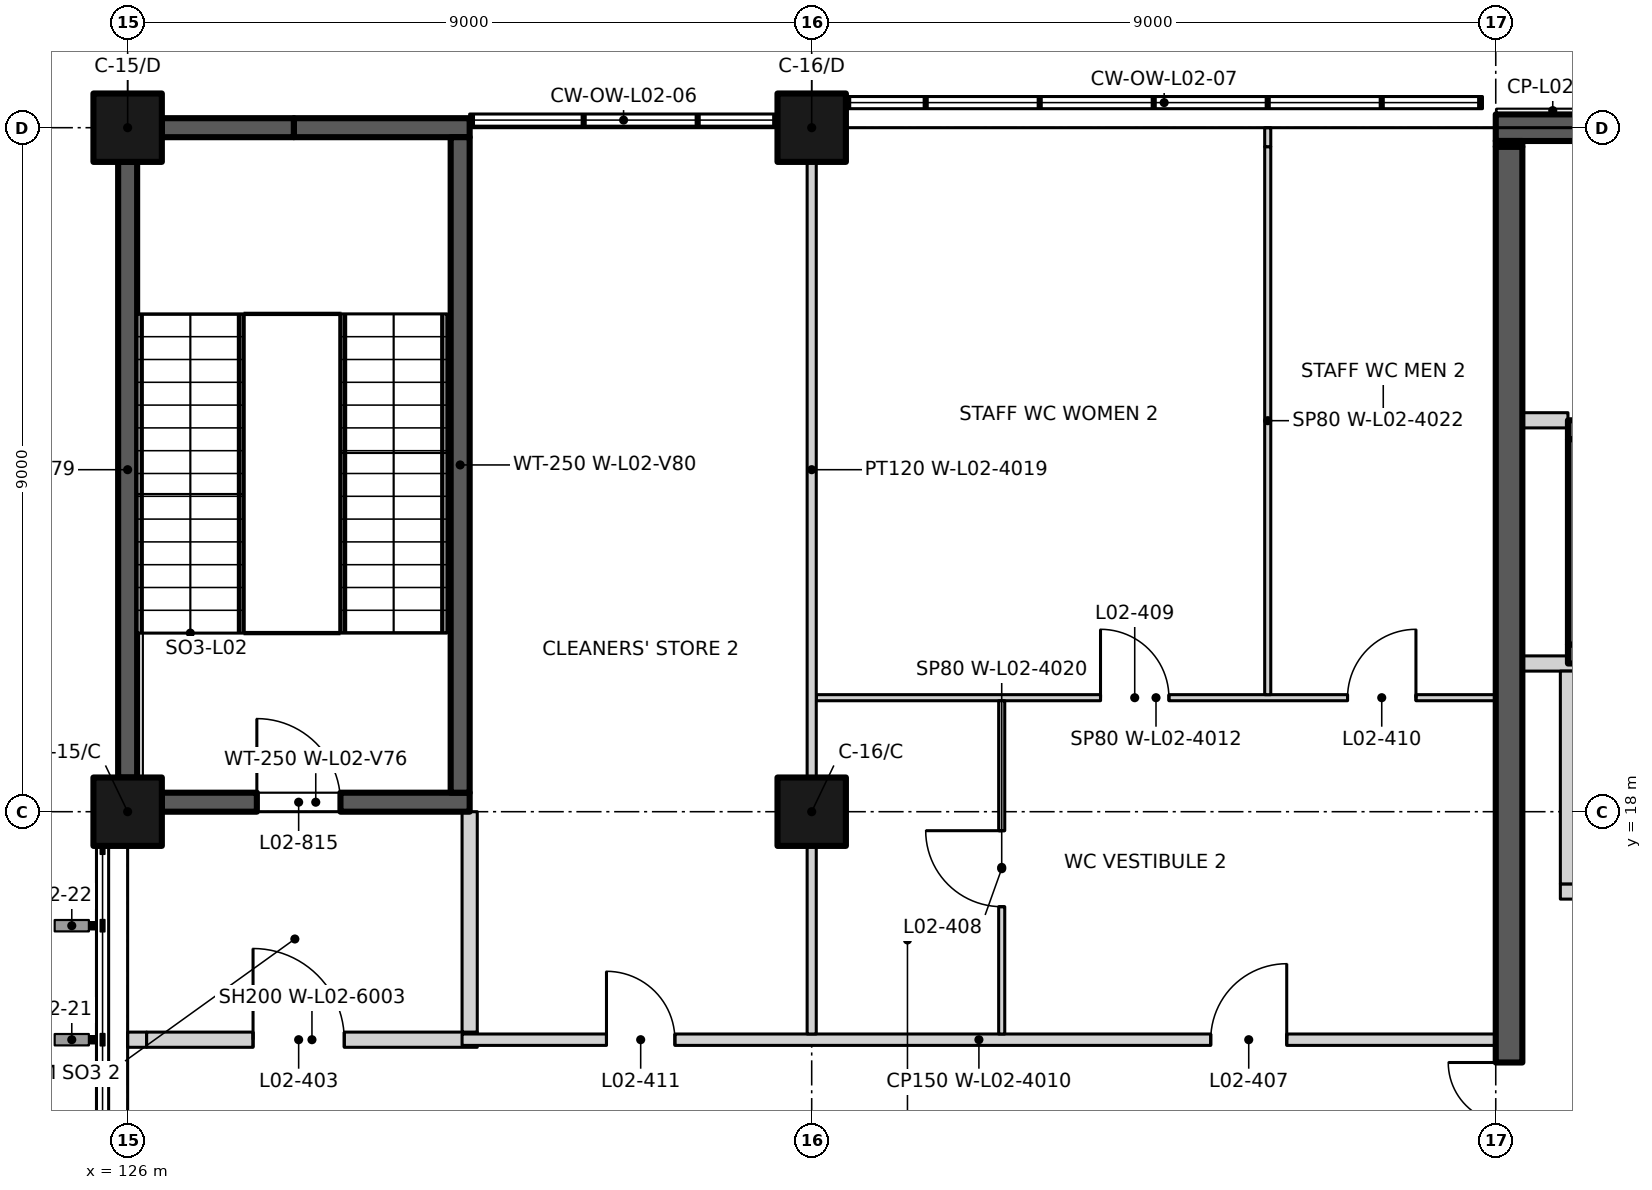
"""IFC4 building model, lengths in metres.
Left out: names, types, materials, properties, quantities, classifications, styles, units other than length and angle.
Written with IfcOpenShell. Run it as: python <this file> out.ifc"""

import sys

from ifc_helpers import new_model, si_unit, direction, frame, frame_2d, origin, origin_2d, place, context, subcontext, project, spatial, rectangle, extrude, element, fill, save


model = new_model("IFC4")
c1 = context("Model", 3, precision=1e-05, world=origin(), true_north=direction((0.0, 1.0)))
c2 = subcontext(c1, "Body", "Model", "MODEL_VIEW")
j1 = project(units=[si_unit("LENGTHUNIT", "METRE"), si_unit("PLANEANGLEUNIT", "RADIAN")], contexts=[c1])
p1 = place(None, origin())
s1 = spatial("IfcSite", under=j1, at=p1, CompositionType="ELEMENT")
p2 = place(p1, origin())
s2 = spatial("IfcBuilding", under=s1, at=p2, CompositionType="ELEMENT")
p3 = place(p2, frame((0.0, 0.0, 10.5)))
s3 = spatial("IfcBuildingStorey", under=s2, at=p3, CompositionType="ELEMENT", Elevation=10.5)
for number, where, z_axis, x_axis in (
    (1, (126.0, 18.0, 0.0), (0.0, 0.0, 1.0), (1.0, 0.0, 0.0)),
    (2, (135.0, 18.0, 0.0), (0.0, 0.0, 1.0), (1.0, 0.0, 0.0)),
    (3, (126.0, 27.0, 0.0), (0.0, 0.0, 1.0), (1.0, 0.0, 0.0)),
    (4, (135.0, 27.0, 0.0), (0.0, 0.0, 1.0), (1.0, 0.0, 0.0)),
):
    element("IfcColumn", number, at=place(p3, frame(where, z_axis=z_axis, x_axis=x_axis)), inside=s3, PredefinedType="COLUMN", context=c2, shape_type="SweptSolid", body=[
        extrude(rectangle(XDim=0.9, YDim=0.9, at=origin_2d()), origin(), (0.0, 0.0, 1.0), 4.5),
    ])
p4 = place(p3, frame((126.45, 18.125, 0.0), z_axis=(0.0, 0.0, 1.0), x_axis=(1.0, 0.0, 0.0)))
e5 = element("IfcWall", 5, at=p4, inside=s3, PredefinedType="SHEAR", context=c2, shape_type="SweptSolid", body=[
    extrude(rectangle(XDim=4.05, YDim=0.25, at=frame_2d((2.025, 0.0))), origin(), (0.0, 0.0, 1.0), 4.5),
])
p5 = place(p4, frame((1.25, 0.0, 0.0)))
e6 = element("IfcOpeningElement", 6, at=p5, cuts=e5, PredefinedType="OPENING", context=c2, shape_type="SweptSolid", body=[
    extrude(rectangle(XDim=1.1, YDim=2.1, at=frame_2d((0.55, 1.05))), frame((0.0, 0.135, 0.0), z_axis=(0.0, -1.0, 0.0), x_axis=(1.0, 0.0, 0.0)), (0.0, 0.0, 1.0), 0.27),
])
p6 = place(p3, frame((126.45, 27.0, 0.0), z_axis=(0.0, 0.0, 1.0), x_axis=(1.0, 0.0, 0.0)))
e7 = element("IfcWall", 7, at=p6, inside=s3, PredefinedType="SHEAR", context=c2, shape_type="SweptSolid", body=[
    extrude(rectangle(XDim=1.738, YDim=0.25, at=frame_2d((0.869, 0.0))), origin(), (0.0, 0.0, 1.0), 4.5),
])
p7 = place(p3, frame((128.188, 27.0, 0.0), z_axis=(0.0, 0.0, 1.0), x_axis=(1.0, 0.0, 0.0)))
e8 = element("IfcWall", 8, at=p7, inside=s3, PredefinedType="SHEAR", context=c2, shape_type="SweptSolid", body=[
    extrude(rectangle(XDim=2.312, YDim=0.25, at=frame_2d((1.156, 0.0))), origin(), (0.0, 0.0, 1.0), 4.5),
])
p8 = place(p3, frame((126.0, 18.45, 0.0), z_axis=(0.0, 0.0, 1.0), x_axis=(0.0, 1.0, 0.0)))
e9 = element("IfcWall", 9, at=p8, inside=s3, PredefinedType="SHEAR", context=c2, shape_type="SweptSolid", body=[
    extrude(rectangle(XDim=8.1, YDim=0.25, at=frame_2d((4.05, 0.0))), origin(), (0.0, 0.0, 1.0), 4.5),
])
p9 = place(p3, frame((130.375, 18.25, 0.0), z_axis=(0.0, 0.0, 1.0), x_axis=(0.0, 1.0, 0.0)))
e10 = element("IfcWall", 10, at=p9, inside=s3, PredefinedType="SHEAR", context=c2, shape_type="SweptSolid", body=[
    extrude(rectangle(XDim=8.625, YDim=0.25, at=frame_2d((4.312, 0.0))), origin(), (0.0, 0.0, 1.0), 4.5),
])
p10 = place(p3, frame((144.95, 20.075, 0.0), z_axis=(0.0, 0.0, 1.0), x_axis=(1.0, 0.0, 0.0)))
e11 = element("IfcWall", 11, at=p10, inside=s3, PredefinedType="SHEAR", context=c2, shape_type="SweptSolid", body=[
    extrude(rectangle(XDim=6.15, YDim=0.25, at=frame_2d((3.075, 0.0))), origin(), (0.0, 0.0, 1.0), 4.5),
])
p11 = place(p10, frame((1.05, 0.0, 0.0)))
e12 = element("IfcOpeningElement", 12, at=p11, cuts=e11, PredefinedType="OPENING", context=c2, shape_type="SweptSolid", body=[
    extrude(rectangle(XDim=1.1, YDim=2.1, at=frame_2d((0.55, 1.05))), frame((0.0, 0.135, 0.0), z_axis=(0.0, -1.0, 0.0), x_axis=(1.0, 0.0, 0.0)), (0.0, 0.0, 1.0), 0.27),
])
p12 = place(p10, frame((4.0, 0.0, 0.0)))
e13 = element("IfcOpeningElement", 13, at=p12, cuts=e11, PredefinedType="OPENING", context=c2, shape_type="SweptSolid", body=[
    extrude(rectangle(XDim=1.1, YDim=2.1, at=frame_2d((0.55, 1.05))), frame((0.0, 0.135, 0.0), z_axis=(0.0, -1.0, 0.0), x_axis=(1.0, 0.0, 0.0)), (0.0, 0.0, 1.0), 0.27),
])
p13 = place(p3, frame((144.95, 23.025, 0.0), z_axis=(0.0, 0.0, 1.0), x_axis=(1.0, 0.0, 0.0)))
e14 = element("IfcWall", 14, at=p13, inside=s3, PredefinedType="SHEAR", context=c2, shape_type="SweptSolid", body=[
    extrude(rectangle(XDim=6.15, YDim=0.25, at=frame_2d((3.075, 0.0))), origin(), (0.0, 0.0, 1.0), 4.5),
])
p14 = place(p3, frame((145.075, 20.2, 0.0), z_axis=(0.0, 0.0, 1.0), x_axis=(0.0, 1.0, 0.0)))
e15 = element("IfcWall", 15, at=p14, inside=s3, PredefinedType="SHEAR", context=c2, shape_type="SweptSolid", body=[
    extrude(rectangle(XDim=2.7, YDim=0.25, at=frame_2d((1.35, 0.0))), origin(), (0.0, 0.0, 1.0), 4.5),
])
p15 = place(p3, frame((144.0, 27.0, 0.0), z_axis=(0.0, 0.0, 1.0), x_axis=(1.0, 0.0, 0.0)))
e16 = element("IfcWall", 16, at=p15, inside=s3, PredefinedType="SOLIDWALL", context=c2, shape_type="SweptSolid", body=[
    extrude(rectangle(XDim=18.0, YDim=0.35, at=frame_2d((9.0, 0.0))), origin(), (0.0, 0.0, 1.0), 3.6),
])
p16 = place(p15, frame((4.2, 0.0, 0.6)))
e17 = element("IfcOpeningElement", 17, at=p16, cuts=e16, PredefinedType="OPENING", context=c2, shape_type="SweptSolid", body=[
    extrude(rectangle(XDim=0.6, YDim=2.4, at=frame_2d((0.3, 1.2))), frame((0.0, 0.185, 0.0), z_axis=(0.0, -1.0, 0.0), x_axis=(1.0, 0.0, 0.0)), (0.0, 0.0, 1.0), 0.37),
])
p17 = place(p15, frame((13.2, 0.0, 0.6)))
e18 = element("IfcOpeningElement", 18, at=p17, cuts=e16, PredefinedType="OPENING", context=c2, shape_type="SweptSolid", body=[
    extrude(rectangle(XDim=0.6, YDim=2.4, at=frame_2d((0.3, 1.2))), frame((0.0, 0.185, 0.0), z_axis=(0.0, -1.0, 0.0), x_axis=(1.0, 0.0, 0.0)), (0.0, 0.0, 1.0), 0.37),
])
p18 = place(p3, frame((126.0, 15.0, 0.0), z_axis=(0.0, 0.0, 1.0), x_axis=(1.0, 0.0, 0.0)))
e19 = element("IfcWall", 19, at=p18, inside=s3, PredefinedType="PARTITIONING", context=c2, shape_type="SweptSolid", body=[
    extrude(rectangle(XDim=0.25, YDim=0.2, at=frame_2d((0.125, 0.0))), origin(), (0.0, 0.0, 1.0), 3.6),
])
p19 = place(p3, frame((126.25, 15.0, 0.0), z_axis=(0.0, 0.0, 1.0), x_axis=(1.0, 0.0, 0.0)))
e20 = element("IfcWall", 20, at=p19, inside=s3, PredefinedType="PARTITIONING", context=c2, shape_type="SweptSolid", body=[
    extrude(rectangle(XDim=4.35, YDim=0.2, at=frame_2d((2.175, 0.0))), origin(), (0.0, 0.0, 1.0), 4.2),
])
p20 = place(p19, frame((1.4, 0.0, 0.0)))
e21 = element("IfcOpeningElement", 21, at=p20, cuts=e20, PredefinedType="OPENING", context=c2, shape_type="SweptSolid", body=[
    extrude(rectangle(XDim=1.2, YDim=2.1, at=frame_2d((0.6, 1.05))), frame((0.0, 0.11, 0.0), z_axis=(0.0, -1.0, 0.0), x_axis=(1.0, 0.0, 0.0)), (0.0, 0.0, 1.0), 0.22),
])
p21 = place(p3, frame((130.4, 15.0, 0.0), z_axis=(0.0, 0.0, 1.0), x_axis=(1.0, 0.0, 0.0)))
e22 = element("IfcWall", 22, at=p21, inside=s3, PredefinedType="PARTITIONING", context=c2, shape_type="SweptSolid", body=[
    extrude(rectangle(XDim=13.6, YDim=0.15, at=frame_2d((6.8, 0.0))), origin(), (0.0, 0.0, 1.0), 4.2),
])
p22 = place(p21, frame((9.85, 0.0, 0.0)))
e23 = element("IfcOpeningElement", 23, at=p22, cuts=e22, PredefinedType="OPENING", context=c2, shape_type="SweptSolid", body=[
    extrude(rectangle(XDim=1.0, YDim=2.1, at=frame_2d((0.5, 1.05))), frame((0.0, 0.085, 0.0), z_axis=(0.0, -1.0, 0.0), x_axis=(1.0, 0.0, 0.0)), (0.0, 0.0, 1.0), 0.17),
])
p23 = place(p21, frame((1.9, 0.0, 0.0)))
e24 = element("IfcOpeningElement", 24, at=p23, cuts=e22, PredefinedType="OPENING", context=c2, shape_type="SweptSolid", body=[
    extrude(rectangle(XDim=0.9, YDim=2.1, at=frame_2d((0.45, 1.05))), frame((0.0, 0.085, 0.0), z_axis=(0.0, -1.0, 0.0), x_axis=(1.0, 0.0, 0.0)), (0.0, 0.0, 1.0), 0.17),
])
p24 = place(p3, frame((144.85, 16.95, 0.0), z_axis=(0.0, 0.0, 1.0), x_axis=(1.0, 0.0, 0.0)))
e25 = element("IfcWall", 25, at=p24, inside=s3, PredefinedType="PARTITIONING", context=c2, shape_type="SweptSolid", body=[
    extrude(rectangle(XDim=6.35, YDim=0.2, at=frame_2d((3.175, 0.0))), origin(), (0.0, 0.0, 1.0), 4.2),
])
p25 = place(p24, frame((2.575, 0.0, 0.0)))
e26 = element("IfcOpeningElement", 26, at=p25, cuts=e25, PredefinedType="OPENING", context=c2, shape_type="SweptSolid", body=[
    extrude(rectangle(XDim=1.2, YDim=2.1, at=frame_2d((0.6, 1.05))), frame((0.0, 0.11, 0.0), z_axis=(0.0, -1.0, 0.0), x_axis=(1.0, 0.0, 0.0)), (0.0, 0.0, 1.0), 0.22),
])
p26 = place(p3, frame((135.06, 19.5, 0.0), z_axis=(0.0, 0.0, 1.0), x_axis=(1.0, 0.0, 0.0)))
e27 = element("IfcWall", 27, at=p26, inside=s3, PredefinedType="PARTITIONING", context=c2, shape_type="SweptSolid", body=[
    extrude(rectangle(XDim=8.94, YDim=0.08, at=frame_2d((4.47, 0.0))), origin(), (0.0, 0.0, 1.0), 4.2),
])
p27 = place(p26, frame((3.74, 0.0, 0.0)))
e28 = element("IfcOpeningElement", 28, at=p27, cuts=e27, PredefinedType="OPENING", context=c2, shape_type="SweptSolid", body=[
    extrude(rectangle(XDim=0.9, YDim=2.1, at=frame_2d((0.45, 1.05))), frame((0.0, 0.05, 0.0), z_axis=(0.0, -1.0, 0.0), x_axis=(1.0, 0.0, 0.0)), (0.0, 0.0, 1.0), 0.1),
])
p28 = place(p26, frame((6.99, 0.0, 0.0)))
e29 = element("IfcOpeningElement", 29, at=p28, cuts=e27, PredefinedType="OPENING", context=c2, shape_type="SweptSolid", body=[
    extrude(rectangle(XDim=0.9, YDim=2.1, at=frame_2d((0.45, 1.05))), frame((0.0, 0.05, 0.0), z_axis=(0.0, -1.0, 0.0), x_axis=(1.0, 0.0, 0.0)), (0.0, 0.0, 1.0), 0.1),
])
p29 = place(p3, frame((144.35, 19.95, 0.0), z_axis=(0.0, 0.0, 1.0), x_axis=(1.0, 0.0, 0.0)))
e30 = element("IfcWall", 30, at=p29, inside=s3, PredefinedType="PARTITIONING", context=c2, shape_type="SweptSolid", body=[
    extrude(rectangle(XDim=0.7, YDim=0.2, at=frame_2d((0.35, 0.0))), origin(), (0.0, 0.0, 1.0), 4.2),
])
p30 = place(p3, frame((144.35, 23.15, 0.0), z_axis=(0.0, 0.0, 1.0), x_axis=(1.0, 0.0, 0.0)))
e31 = element("IfcWall", 31, at=p30, inside=s3, PredefinedType="PARTITIONING", context=c2, shape_type="SweptSolid", body=[
    extrude(rectangle(XDim=0.6, YDim=0.2, at=frame_2d((0.3, 0.0))), origin(), (0.0, 0.0, 1.0), 4.2),
])
p31 = place(p3, frame((130.5, 15.1, 0.0), z_axis=(0.0, 0.0, 1.0), x_axis=(0.0, 1.0, 0.0)))
e32 = element("IfcWall", 32, at=p31, inside=s3, PredefinedType="PARTITIONING", context=c2, shape_type="SweptSolid", body=[
    extrude(rectangle(XDim=2.9, YDim=0.2, at=frame_2d((1.45, 0.0))), origin(), (0.0, 0.0, 1.0), 4.2),
])
p32 = place(p3, frame((135.0, 15.075, 0.0), z_axis=(0.0, 0.0, 1.0), x_axis=(0.0, 1.0, 0.0)))
e33 = element("IfcWall", 33, at=p32, inside=s3, PredefinedType="PARTITIONING", context=c2, shape_type="SweptSolid", body=[
    extrude(rectangle(XDim=2.475, YDim=0.12, at=frame_2d((1.238, 0.0))), origin(), (0.0, 0.0, 1.0), 4.2),
])
p33 = place(p3, frame((135.0, 18.45, 0.0), z_axis=(0.0, 0.0, 1.0), x_axis=(0.0, 1.0, 0.0)))
e34 = element("IfcWall", 34, at=p33, inside=s3, PredefinedType="PARTITIONING", context=c2, shape_type="SweptSolid", body=[
    extrude(rectangle(XDim=8.1, YDim=0.12, at=frame_2d((4.05, 0.0))), origin(), (0.0, 0.0, 1.0), 4.2),
])
p34 = place(p3, frame((137.5, 15.075, 0.0), z_axis=(0.0, 0.0, 1.0), x_axis=(0.0, 1.0, 0.0)))
e35 = element("IfcWall", 35, at=p34, inside=s3, PredefinedType="PARTITIONING", context=c2, shape_type="SweptSolid", body=[
    extrude(rectangle(XDim=4.385, YDim=0.08, at=frame_2d((2.192, 0.0))), origin(), (0.0, 0.0, 1.0), 4.2),
])
p35 = place(p34, frame((1.675, 0.0, 0.0)))
e36 = element("IfcOpeningElement", 36, at=p35, cuts=e35, PredefinedType="OPENING", context=c2, shape_type="SweptSolid", body=[
    extrude(rectangle(XDim=1.0, YDim=2.1, at=frame_2d((0.5, 1.05))), frame((0.0, 0.05, 0.0), z_axis=(0.0, -1.0, 0.0), x_axis=(1.0, 0.0, 0.0)), (0.0, 0.0, 1.0), 0.1),
])
p36 = place(p3, frame((141.0, 19.54, 0.0), z_axis=(0.0, 0.0, 1.0), x_axis=(0.0, 1.0, 0.0)))
e37 = element("IfcWall", 37, at=p36, inside=s3, PredefinedType="PARTITIONING", context=c2, shape_type="SweptSolid", body=[
    extrude(rectangle(XDim=7.21, YDim=0.08, at=frame_2d((3.605, 0.0))), origin(), (0.0, 0.0, 1.0), 4.2),
])
p37 = place(p3, frame((141.0, 26.75, 0.0), z_axis=(0.0, 0.0, 1.0), x_axis=(0.0, 1.0, 0.0)))
e38 = element("IfcWall", 38, at=p37, inside=s3, PredefinedType="PARTITIONING", context=c2, shape_type="SweptSolid", body=[
    extrude(rectangle(XDim=0.25, YDim=0.08, at=frame_2d((0.125, 0.0))), origin(), (0.0, 0.0, 1.0), 3.6),
])
p38 = place(p3, frame((144.175, 9.35, 0.0), z_axis=(0.0, 0.0, 1.0), x_axis=(0.0, 1.0, 0.0)))
e39 = element("IfcWall", 39, at=p38, inside=s3, PredefinedType="SHEAR", context=c2, shape_type="SweptSolid", body=[
    extrude(rectangle(XDim=17.4, YDim=0.35, at=frame_2d((8.7, 0.0))), origin(), (0.0, 0.0, 1.0), 4.2),
])
p39 = place(p38, frame((3.75, 0.0, 0.0)))
e40 = element("IfcOpeningElement", 40, at=p39, cuts=e39, PredefinedType="OPENING", context=c2, shape_type="SweptSolid", body=[
    extrude(rectangle(XDim=1.6, YDim=2.4, at=frame_2d((0.8, 1.2))), frame((0.0, 0.185, 0.0), z_axis=(0.0, -1.0, 0.0), x_axis=(1.0, 0.0, 0.0)), (0.0, 0.0, 1.0), 0.37),
])
p40 = place(p3, frame((144.175, 26.75, 0.0), z_axis=(0.0, 0.0, 1.0), x_axis=(0.0, 1.0, 0.0)))
e41 = element("IfcWall", 41, at=p40, inside=s3, PredefinedType="SHEAR", context=c2, shape_type="SweptSolid", body=[
    extrude(rectangle(XDim=0.075, YDim=0.35, at=frame_2d((0.038, 0.0))), origin(), (0.0, 0.0, 1.0), 3.6),
])
p41 = place(p3, frame((144.95, 17.05, 0.0), z_axis=(0.0, 0.0, 1.0), x_axis=(0.0, 1.0, 0.0)))
e42 = element("IfcWall", 42, at=p41, inside=s3, PredefinedType="PARTITIONING", context=c2, shape_type="SweptSolid", body=[
    extrude(rectangle(XDim=2.8, YDim=0.2, at=frame_2d((1.4, 0.0))), origin(), (0.0, 0.0, 1.0), 4.2),
])
p42 = place(p5, origin())
e43 = element("IfcDoor", 43, at=p42, inside=s3, OperationType="SINGLE_SWING_LEFT", PredefinedType="DOOR", context=c2, shape_type="SweptSolid", body=[
    extrude(rectangle(XDim=1.1, YDim=2.1, at=frame_2d((0.55, 1.05))), frame((0.0, 0.025, 0.0), z_axis=(0.0, -1.0, 0.0), x_axis=(1.0, 0.0, 0.0)), (0.0, 0.0, 1.0), 0.05),
])
fill(e6, e43)
p43 = place(p20, origin())
e44 = element("IfcDoor", 44, at=p43, inside=s3, OperationType="SINGLE_SWING_LEFT", PredefinedType="DOOR", context=c2, shape_type="SweptSolid", body=[
    extrude(rectangle(XDim=1.2, YDim=2.1, at=frame_2d((0.6, 1.05))), frame((0.0, 0.025, 0.0), z_axis=(0.0, -1.0, 0.0), x_axis=(1.0, 0.0, 0.0)), (0.0, 0.0, 1.0), 0.05),
])
fill(e21, e44)
p44 = place(p39, origin())
e45 = element("IfcDoor", 45, at=p44, inside=s3, OperationType="DOUBLE_DOOR_SINGLE_SWING", PredefinedType="DOOR", context=c2, shape_type="SweptSolid", body=[
    extrude(rectangle(XDim=1.6, YDim=2.4, at=frame_2d((0.8, 1.2))), frame((0.0, 0.025, 0.0), z_axis=(0.0, -1.0, 0.0), x_axis=(1.0, 0.0, 0.0)), (0.0, 0.0, 1.0), 0.05),
])
fill(e40, e45)
p45 = place(p22, origin())
e46 = element("IfcDoor", 46, at=p45, inside=s3, OperationType="SINGLE_SWING_RIGHT", PredefinedType="DOOR", context=c2, shape_type="SweptSolid", body=[
    extrude(rectangle(XDim=1.0, YDim=2.1, at=frame_2d((0.5, 1.05))), frame((0.0, 0.025, 0.0), z_axis=(0.0, -1.0, 0.0), x_axis=(1.0, 0.0, 0.0)), (0.0, 0.0, 1.0), 0.05),
])
fill(e23, e46)
p46 = place(p35, origin())
e47 = element("IfcDoor", 47, at=p46, inside=s3, OperationType="SINGLE_SWING_RIGHT", PredefinedType="DOOR", context=c2, shape_type="SweptSolid", body=[
    extrude(rectangle(XDim=1.0, YDim=2.1, at=frame_2d((0.5, 1.05))), frame((0.0, 0.025, 0.0), z_axis=(0.0, -1.0, 0.0), x_axis=(1.0, 0.0, 0.0)), (0.0, 0.0, 1.0), 0.05),
])
fill(e36, e47)
p47 = place(p27, origin())
e48 = element("IfcDoor", 48, at=p47, inside=s3, OperationType="SINGLE_SWING_LEFT", PredefinedType="DOOR", context=c2, shape_type="SweptSolid", body=[
    extrude(rectangle(XDim=0.9, YDim=2.1, at=frame_2d((0.45, 1.05))), frame((0.0, 0.025, 0.0), z_axis=(0.0, -1.0, 0.0), x_axis=(1.0, 0.0, 0.0)), (0.0, 0.0, 1.0), 0.05),
])
fill(e28, e48)
p48 = place(p28, origin())
e49 = element("IfcDoor", 49, at=p48, inside=s3, OperationType="SINGLE_SWING_RIGHT", PredefinedType="DOOR", context=c2, shape_type="SweptSolid", body=[
    extrude(rectangle(XDim=0.9, YDim=2.1, at=frame_2d((0.45, 1.05))), frame((0.0, 0.025, 0.0), z_axis=(0.0, -1.0, 0.0), x_axis=(1.0, 0.0, 0.0)), (0.0, 0.0, 1.0), 0.05),
])
fill(e29, e49)
p49 = place(p23, origin())
e50 = element("IfcDoor", 50, at=p49, inside=s3, OperationType="SINGLE_SWING_LEFT", PredefinedType="DOOR", context=c2, shape_type="SweptSolid", body=[
    extrude(rectangle(XDim=0.9, YDim=2.1, at=frame_2d((0.45, 1.05))), frame((0.0, 0.025, 0.0), z_axis=(0.0, -1.0, 0.0), x_axis=(1.0, 0.0, 0.0)), (0.0, 0.0, 1.0), 0.05),
])
fill(e24, e50)
save(model, sys.argv[1])
